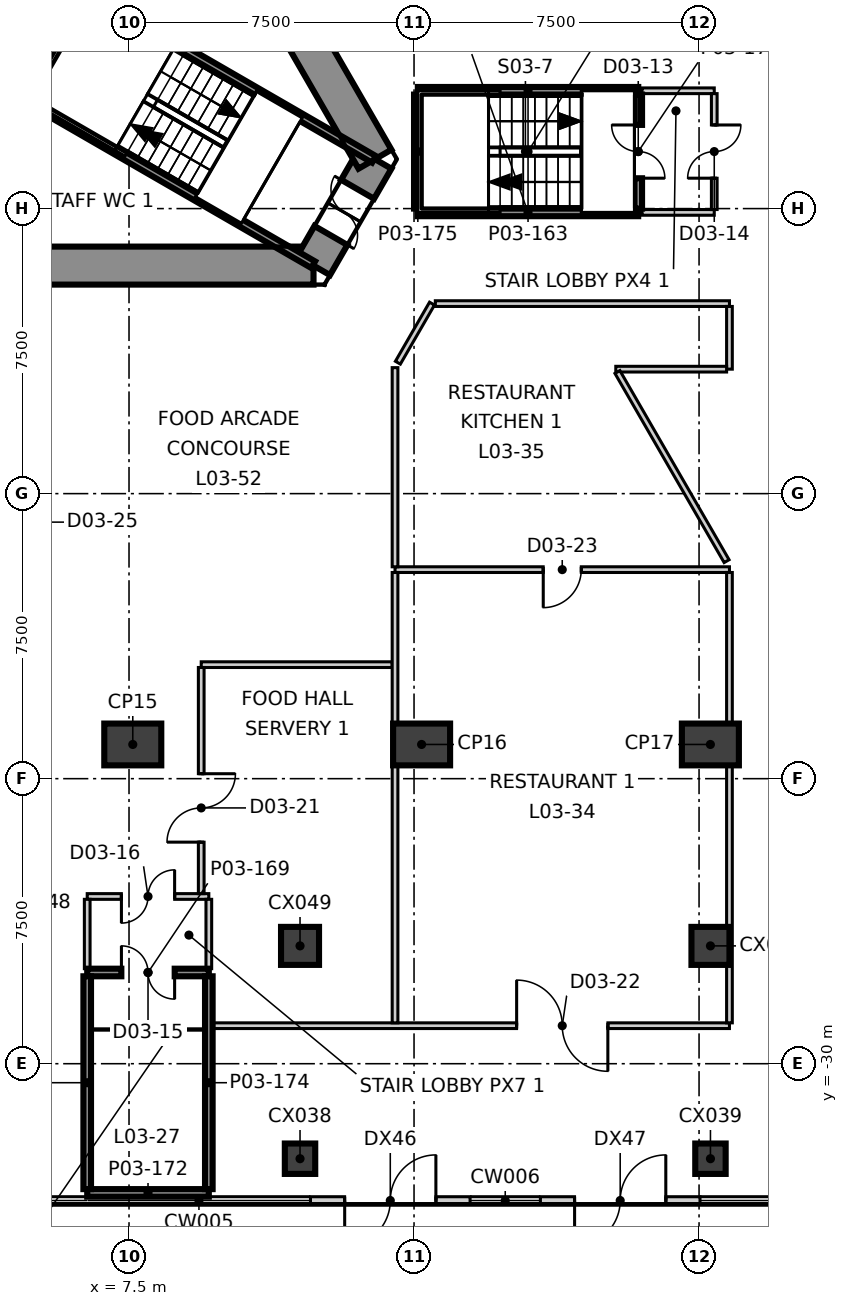
"""IFC4 building model, lengths in metres.
Left out: names, types, materials, properties, quantities, classifications, styles, units other than length and angle.
Written with IfcOpenShell. Run it as: python <this file> out.ifc"""

import sys

from ifc_helpers import new_model, si_unit, direction, frame, frame_2d, origin, origin_2d, place, context, subcontext, project, spatial, polyline, rectangle, outline, extrude, element, fill, save


model = new_model("IFC4")
c1 = context("Model", 3, precision=1e-05, world=origin(), true_north=direction((0.0, 1.0)))
c2 = subcontext(c1, "Body", "Model", "MODEL_VIEW")
j1 = project(units=[si_unit("LENGTHUNIT", "METRE"), si_unit("PLANEANGLEUNIT", "RADIAN")], contexts=[c1])
p1 = place(None, origin())
s1 = spatial("IfcSite", under=j1, at=p1, CompositionType="ELEMENT")
p2 = place(p1, origin())
s2 = spatial("IfcBuilding", under=s1, at=p2, CompositionType="ELEMENT")
p3 = place(p2, frame((0.0, 0.0, 19.9)))
s3 = spatial("IfcBuildingStorey", under=s2, at=p3, CompositionType="ELEMENT", Elevation=19.9)
p4 = place(p3, frame((-12.355, -9.0, -0.4), z_axis=(0.0, 0.0, 1.0), x_axis=(1.0, 0.0, 0.0)))
e1 = element("IfcWall", 1, at=p4, inside=s3, PredefinedType="SHEAR", context=c2, shape_type="SweptSolid", body=[
    extrude(outline(polyline([(-0.289, -0.5), (1.656, -0.5), (3.601, -0.5), (5.547, -0.5), (7.492, -0.5), (9.437, -0.5), (11.382, -0.5), (13.328, -0.5), (15.273, -0.5), (17.218, -0.5), (19.163, -0.5), (21.109, -0.5), (23.054, -0.5), (24.999, -0.5), (24.422, 0.5), (22.566, 0.5), (20.709, 0.5), (18.853, 0.5), (16.996, 0.5), (15.14, 0.5), (13.283, 0.5), (11.427, 0.5), (9.57, 0.5), (7.714, 0.5), (5.857, 0.5), (4.001, 0.5), (2.145, 0.5), (0.288, 0.5), (-0.289, -0.5)])), origin(), (0.0, 0.0, 1.0), 5.4),
])
p5 = place(p3, frame((12.355, -9.0, -0.4), z_axis=(0.0, 0.0, 1.0), x_axis=(0.500077567175, 0.865980615723, 0.0)))
e2 = element("IfcWall", 2, at=p5, inside=s3, PredefinedType="SHEAR", context=c2, shape_type="SweptSolid", body=[
    extrude(outline(polyline([(-0.288, -0.5), (1.617, -0.5), (3.522, -0.5), (2.945, 0.5), (1.617, 0.5), (0.289, 0.499), (-0.288, -0.5)])), origin(), (0.0, 0.0, 1.0), 5.4),
])
p6 = place(p5, frame((0.917, 0.0, 0.4)))
e3 = element("IfcOpeningElement", 3, at=p6, cuts=e2, PredefinedType="OPENING", context=c2, shape_type="SweptSolid", body=[
    extrude(rectangle(XDim=1.4, YDim=2.1, at=frame_2d((0.7, 1.05))), frame((0.0, 0.51, 0.0), z_axis=(0.0, -1.0, 0.0), x_axis=(1.0, 0.0, 0.0)), (0.0, 0.0, 1.0), 1.02),
])
p7 = place(p3, frame((13.972, -6.2, -0.4), z_axis=(0.0, 0.0, 1.0), x_axis=(-0.499992141631, 0.866029940768, 0.0)))
e4 = element("IfcWall", 4, at=p7, inside=s3, PredefinedType="SHEAR", context=c2, shape_type="SweptSolid", body=[
    extrude(outline(polyline([(-0.288, -0.5), (1.657, -0.5), (3.602, -0.5), (5.547, -0.5), (7.493, -0.5), (9.438, -0.5), (11.383, -0.5), (13.328, -0.5), (15.273, -0.5), (17.218, -0.499), (19.164, -0.499), (21.109, -0.499), (23.054, -0.499), (24.999, -0.499), (24.422, 0.5), (22.566, 0.5), (20.709, 0.5), (18.853, 0.5), (16.996, 0.5), (15.14, 0.5), (13.283, 0.5), (11.427, 0.5), (9.57, 0.5), (7.714, 0.5), (5.857, 0.5), (4.001, 0.5), (2.145, 0.5), (0.288, 0.5), (-0.288, -0.5)])), origin(), (0.0, 0.0, 1.0), 5.4),
])
p8 = place(p7, frame((11.455, 0.0, 0.4)))
e5 = element("IfcOpeningElement", 5, at=p8, cuts=e4, PredefinedType="OPENING", context=c2, shape_type="SweptSolid", body=[
    extrude(rectangle(XDim=1.8, YDim=2.1, at=frame_2d((0.9, 1.05))), frame((0.0, 0.51, 0.0), z_axis=(0.0, -1.0, 0.0), x_axis=(1.0, 0.0, 0.0)), (0.0, 0.0, 1.0), 1.02),
])
for number, where, z_axis, x_axis in (
    (6, (7.599, -21.6, -0.4), (0.0, 0.0, 1.0), (1.0, 0.0, 0.0)),
    (7, (15.199, -21.6, -0.4), (0.0, 0.0, 1.0), (1.0, 0.0, 0.0)),
    (8, (22.798, -21.6, -0.4), (0.0, 0.0, 1.0), (1.0, 0.0, 0.0)),
):
    element("IfcColumn", number, at=place(p3, frame(where, z_axis=z_axis, x_axis=x_axis)), inside=s3, PredefinedType="COLUMN", context=c2, shape_type="SweptSolid", body=[
        extrude(rectangle(XDim=1.5, YDim=1.1, at=origin_2d()), origin(), (0.0, 0.0, 1.0), 5.4),
    ])
for number, where, z_axis, x_axis in (
    (9, (12.0, -32.5, -0.4), (0.0, 0.0, 1.0), (1.0, 0.0, 0.0)),
    (10, (22.8, -32.5, -0.4), (0.0, 0.0, 1.0), (1.0, 0.0, 0.0)),
):
    element("IfcColumn", number, at=place(p3, frame(where, z_axis=z_axis, x_axis=x_axis)), inside=s3, PredefinedType="COLUMN", context=c2, shape_type="SweptSolid", body=[
        extrude(rectangle(XDim=0.8, YDim=0.8, at=origin_2d()), origin(), (0.0, 0.0, 1.0), 5.4),
    ])
for number, where, z_axis, x_axis in (
    (11, (12.0, -26.9, -0.4), (0.0, 0.0, 1.0), (1.0, 0.0, 0.0)),
    (12, (22.8, -26.9, -0.4), (0.0, 0.0, 1.0), (1.0, 0.0, 0.0)),
):
    element("IfcColumn", number, at=place(p3, frame(where, z_axis=z_axis, x_axis=x_axis)), inside=s3, PredefinedType="COLUMN", context=c2, shape_type="SweptSolid", body=[
        extrude(rectangle(XDim=1.0, YDim=1.0, at=origin_2d()), origin(), (0.0, 0.0, 1.0), 5.4),
    ])
p9 = place(p3, frame((12.275, -33.6, 0.0), z_axis=(0.0, 0.0, 1.0), x_axis=(1.0, 0.0, 0.0)))
e13 = element("IfcWall", 13, at=p9, inside=s3, PredefinedType="ELEMENTEDWALL", context=c2, shape_type="SweptSolid", body=[
    extrude(rectangle(XDim=4.2, YDim=0.2, at=frame_2d((2.1, 0.0))), origin(), (0.0, 0.0, 1.0), 5.0),
])
p10 = place(p9, frame((0.9, 0.0, 0.0)))
e14 = element("IfcOpeningElement", 14, at=p10, cuts=e13, PredefinedType="OPENING", context=c2, shape_type="SweptSolid", body=[
    extrude(rectangle(XDim=2.4, YDim=2.4, at=frame_2d((1.2, 1.2))), frame((0.0, 0.11, 0.0), z_axis=(0.0, -1.0, 0.0), x_axis=(1.0, 0.0, 0.0)), (0.0, 0.0, 1.0), 0.22),
])
p11 = place(p3, frame((18.325, -33.6, 0.0), z_axis=(0.0, 0.0, 1.0), x_axis=(1.0, 0.0, 0.0)))
e15 = element("IfcWall", 15, at=p11, inside=s3, PredefinedType="ELEMENTEDWALL", context=c2, shape_type="SweptSolid", body=[
    extrude(rectangle(XDim=4.2, YDim=0.2, at=frame_2d((2.1, 0.0))), origin(), (0.0, 0.0, 1.0), 5.0),
])
p12 = place(p11, frame((0.9, 0.0, 0.0)))
e16 = element("IfcOpeningElement", 16, at=p12, cuts=e15, PredefinedType="OPENING", context=c2, shape_type="SweptSolid", body=[
    extrude(rectangle(XDim=2.4, YDim=2.4, at=frame_2d((1.2, 1.2))), frame((0.0, 0.11, 0.0), z_axis=(0.0, -1.0, 0.0), x_axis=(1.0, 0.0, 0.0)), (0.0, 0.0, 1.0), 0.22),
])
for number, where, z_axis, x_axis in (
    (17, (21.0, -7.6, 0.0), (0.0, 0.0, 1.0), (1.0, 0.0, 0.0)),
    (18, (21.0, -4.4, 0.0), (0.0, 0.0, 1.0), (1.0, 0.0, 0.0)),
):
    element("IfcWall", number, at=place(p3, frame(where, z_axis=z_axis, x_axis=x_axis)), inside=s3, PredefinedType="PARTITIONING", context=c2, shape_type="SweptSolid", body=[
        extrude(rectangle(XDim=1.9, YDim=0.15, at=frame_2d((0.95, 0.0))), origin(), (0.0, 0.0, 1.0), 5.0),
    ])
p13 = place(p3, frame((6.4, -25.6, 0.0), z_axis=(0.0, 0.0, 1.0), x_axis=(1.0, 0.0, 0.0)))
e19 = element("IfcWall", 19, at=p13, inside=s3, PredefinedType="PARTITIONING", context=c2, shape_type="SweptSolid", body=[
    extrude(rectangle(XDim=3.2, YDim=0.15, at=frame_2d((1.6, 0.0))), origin(), (0.0, 0.0, 1.0), 5.0),
])
p14 = place(p13, frame((0.9, 0.0, 0.0)))
e20 = element("IfcOpeningElement", 20, at=p14, cuts=e19, PredefinedType="OPENING", context=c2, shape_type="SweptSolid", body=[
    extrude(rectangle(XDim=1.4, YDim=2.1, at=frame_2d((0.7, 1.05))), frame((0.0, 0.085, 0.0), z_axis=(0.0, -1.0, 0.0), x_axis=(1.0, 0.0, 0.0)), (0.0, 0.0, 1.0), 0.17),
])
for number, where, z_axis, x_axis in (
    (21, (6.4, -27.5, 0.0), (0.0, 0.0, 1.0), (0.0, 1.0, 0.0)),
    (22, (9.6, -27.5, 0.0), (0.0, 0.0, 1.0), (0.0, 1.0, 0.0)),
):
    element("IfcWall", number, at=place(p3, frame(where, z_axis=z_axis, x_axis=x_axis)), inside=s3, PredefinedType="PARTITIONING", context=c2, shape_type="SweptSolid", body=[
        extrude(rectangle(XDim=1.825, YDim=0.15, at=frame_2d((0.913, 0.0))), origin(), (0.0, 0.0, 1.0), 5.0),
    ])
p15 = place(p3, frame((14.5, -17.0, 0.0), z_axis=(0.0, 0.0, 1.0), x_axis=(1.0, 0.0, 0.0)))
e23 = element("IfcWall", 23, at=p15, inside=s3, PredefinedType="PARTITIONING", context=c2, shape_type="SweptSolid", body=[
    extrude(rectangle(XDim=8.8, YDim=0.15, at=frame_2d((4.4, 0.0))), origin(), (0.0, 0.0, 1.0), 5.0),
])
p16 = place(p15, frame((3.9, 0.0, 0.0)))
e24 = element("IfcOpeningElement", 24, at=p16, cuts=e23, PredefinedType="OPENING", context=c2, shape_type="SweptSolid", body=[
    extrude(rectangle(XDim=1.0, YDim=2.1, at=frame_2d((0.5, 1.05))), frame((0.0, 0.085, 0.0), z_axis=(0.0, -1.0, 0.0), x_axis=(1.0, 0.0, 0.0)), (0.0, 0.0, 1.0), 0.17),
])
p17 = place(p3, frame((14.5, -16.925, 0.0), z_axis=(0.0, 0.0, 1.0), x_axis=(0.0, 1.0, 0.0)))
e25 = element("IfcWall", 25, at=p17, inside=s3, PredefinedType="PARTITIONING", context=c2, shape_type="SweptSolid", body=[
    extrude(rectangle(XDim=5.24, YDim=0.15, at=frame_2d((2.62, 0.0))), origin(), (0.0, 0.0, 1.0), 5.0),
])
p18 = place(p3, frame((14.575, -11.555, 0.0), z_axis=(0.0, 0.0, 1.0), x_axis=(0.500087302212, 0.865974993961, 0.0)))
e26 = element("IfcWall", 26, at=p18, inside=s3, PredefinedType="PARTITIONING", context=c2, shape_type="SweptSolid", body=[
    extrude(rectangle(XDim=1.796, YDim=0.15, at=frame_2d((0.898, 0.0))), origin(), (0.0, 0.0, 1.0), 5.0),
])
p19 = place(p3, frame((15.56, -10.0, 0.0), z_axis=(0.0, 0.0, 1.0), x_axis=(1.0, 0.0, 0.0)))
e27 = element("IfcWall", 27, at=p19, inside=s3, PredefinedType="PARTITIONING", context=c2, shape_type="SweptSolid", body=[
    extrude(rectangle(XDim=7.74, YDim=0.15, at=frame_2d((3.87, 0.0))), origin(), (0.0, 0.0, 1.0), 5.0),
])
p20 = place(p3, frame((23.3, -11.725, 0.0), z_axis=(0.0, 0.0, 1.0), x_axis=(0.0, 1.0, 0.0)))
e28 = element("IfcWall", 28, at=p20, inside=s3, PredefinedType="PARTITIONING", context=c2, shape_type="SweptSolid", body=[
    extrude(rectangle(XDim=1.65, YDim=0.15, at=frame_2d((0.825, 0.0))), origin(), (0.0, 0.0, 1.0), 5.0),
])
p21 = place(p3, frame((20.309, -11.725, 0.0), z_axis=(0.0, 0.0, 1.0), x_axis=(1.0, 0.0, 0.0)))
e29 = element("IfcWall", 29, at=p21, inside=s3, PredefinedType="PARTITIONING", context=c2, shape_type="SweptSolid", body=[
    extrude(rectangle(XDim=2.916, YDim=0.15, at=frame_2d((1.458, 0.0))), origin(), (0.0, 0.0, 1.0), 5.0),
])
p22 = place(p3, frame((20.352, -11.8, 0.0), z_axis=(0.0, 0.0, 1.0), x_axis=(0.499940652507, -0.866059665364, 0.0)))
e30 = element("IfcWall", 30, at=p22, inside=s3, PredefinedType="PARTITIONING", context=c2, shape_type="SweptSolid", body=[
    extrude(rectangle(XDim=5.747, YDim=0.15, at=frame_2d((2.874, 0.0))), origin(), (0.0, 0.0, 1.0), 5.0),
])
p23 = place(p3, frame((22.9, -7.525, 0.0), z_axis=(0.0, 0.0, 1.0), x_axis=(0.0, 1.0, 0.0)))
e31 = element("IfcWall", 31, at=p23, inside=s3, PredefinedType="PARTITIONING", context=c2, shape_type="SweptSolid", body=[
    extrude(rectangle(XDim=3.05, YDim=0.15, at=frame_2d((1.525, 0.0))), origin(), (0.0, 0.0, 1.0), 5.0),
])
p24 = place(p23, frame((0.825, 0.0, 0.0)))
e32 = element("IfcOpeningElement", 32, at=p24, cuts=e31, PredefinedType="OPENING", context=c2, shape_type="SweptSolid", body=[
    extrude(rectangle(XDim=1.4, YDim=2.1, at=frame_2d((0.7, 1.05))), frame((0.0, 0.085, 0.0), z_axis=(0.0, -1.0, 0.0), x_axis=(1.0, 0.0, 0.0)), (0.0, 0.0, 1.0), 0.17),
])
p25 = place(p3, frame((9.7, -29.0, 0.0), z_axis=(0.0, 0.0, 1.0), x_axis=(1.0, 0.0, 0.0)))
e33 = element("IfcWall", 33, at=p25, inside=s3, PredefinedType="PARTITIONING", context=c2, shape_type="SweptSolid", body=[
    extrude(rectangle(XDim=13.6, YDim=0.15, at=frame_2d((6.8, 0.0))), origin(), (0.0, 0.0, 1.0), 5.0),
])
p26 = place(p25, frame((8.0, 0.0, 0.0)))
e34 = element("IfcOpeningElement", 34, at=p26, cuts=e33, PredefinedType="OPENING", context=c2, shape_type="SweptSolid", body=[
    extrude(rectangle(XDim=2.4, YDim=2.1, at=frame_2d((1.2, 1.05))), frame((0.0, 0.085, 0.0), z_axis=(0.0, -1.0, 0.0), x_axis=(1.0, 0.0, 0.0)), (0.0, 0.0, 1.0), 0.17),
])
p27 = place(p3, frame((9.4, -19.5, 0.0), z_axis=(0.0, 0.0, 1.0), x_axis=(1.0, 0.0, 0.0)))
e35 = element("IfcWall", 35, at=p27, inside=s3, PredefinedType="PARTITIONING", context=c2, shape_type="SweptSolid", body=[
    extrude(rectangle(XDim=5.025, YDim=0.15, at=frame_2d((2.513, 0.0))), origin(), (0.0, 0.0, 1.0), 5.0),
])
p28 = place(p3, frame((9.4, -25.525, 0.0), z_axis=(0.0, 0.0, 1.0), x_axis=(0.0, 1.0, 0.0)))
e36 = element("IfcWall", 36, at=p28, inside=s3, PredefinedType="PARTITIONING", context=c2, shape_type="SweptSolid", body=[
    extrude(rectangle(XDim=5.95, YDim=0.15, at=frame_2d((2.975, 0.0))), origin(), (0.0, 0.0, 1.0), 5.0),
])
p29 = place(p28, frame((1.355, 0.0, 0.0)))
e37 = element("IfcOpeningElement", 37, at=p29, cuts=e36, PredefinedType="OPENING", context=c2, shape_type="SweptSolid", body=[
    extrude(rectangle(XDim=1.8, YDim=2.1, at=frame_2d((0.9, 1.05))), frame((0.0, 0.085, 0.0), z_axis=(0.0, -1.0, 0.0), x_axis=(1.0, 0.0, 0.0)), (0.0, 0.0, 1.0), 0.17),
])
for number, where, z_axis, x_axis in (
    (38, (23.3, -28.925, 0.0), (0.0, 0.0, 1.0), (0.0, 1.0, 0.0)),
    (39, (14.5, -28.925, 0.0), (0.0, 0.0, 1.0), (0.0, 1.0, 0.0)),
):
    element("IfcWall", number, at=place(p3, frame(where, z_axis=z_axis, x_axis=x_axis)), inside=s3, PredefinedType="PARTITIONING", context=c2, shape_type="SweptSolid", body=[
        extrude(rectangle(XDim=11.85, YDim=0.15, at=frame_2d((5.925, 0.0))), origin(), (0.0, 0.0, 1.0), 5.0),
    ])
p30 = place(p3, frame((4.929, -4.693, 0.0), z_axis=(0.0, 0.0, 1.0), x_axis=(0.865987152174, -0.50006624788, 0.0)))
e40 = element("IfcWall", 40, at=p30, inside=s3, PredefinedType="SOLIDWALL", context=c2, shape_type="SweptSolid", body=[
    extrude(rectangle(XDim=8.565, YDim=0.2, at=frame_2d((4.282, 0.0))), origin(), (0.0, 0.0, 1.0), 5.0),
])
p31 = place(p3, frame((4.929, -4.462, 0.0), z_axis=(0.0, 0.0, 1.0), x_axis=(0.500200581029, 0.865909567298, 0.0)))
e41 = element("IfcWall", 41, at=p31, inside=s3, PredefinedType="SOLIDWALL", context=c2, shape_type="SweptSolid", body=[
    extrude(rectangle(XDim=2.799, YDim=0.2, at=frame_2d((1.399, 0.0))), origin(), (0.0, 0.0, 1.0), 5.0),
])
p32 = place(p3, frame((6.529, -1.922, 0.0), z_axis=(0.0, 0.0, 1.0), x_axis=(0.866036527536, -0.499980732602, 0.0)))
e42 = element("IfcWall", 42, at=p32, inside=s3, PredefinedType="SOLIDWALL", context=c2, shape_type="SweptSolid", body=[
    extrude(rectangle(XDim=8.564, YDim=0.2, at=frame_2d((4.282, 0.0))), origin(), (0.0, 0.0, 1.0), 5.0),
])
p33 = place(p3, frame((15.1, -4.4, 0.0), z_axis=(0.0, 0.0, 1.0), x_axis=(1.0, 0.0, 0.0)))
e43 = element("IfcWall", 43, at=p33, inside=s3, PredefinedType="SOLIDWALL", context=c2, shape_type="SweptSolid", body=[
    extrude(rectangle(XDim=5.8, YDim=0.2, at=frame_2d((2.9, 0.0))), origin(), (0.0, 0.0, 1.0), 5.0),
])
p34 = place(p3, frame((15.1, -7.6, 0.0), z_axis=(0.0, 0.0, 1.0), x_axis=(1.0, 0.0, 0.0)))
e44 = element("IfcWall", 44, at=p34, inside=s3, PredefinedType="SOLIDWALL", context=c2, shape_type="SweptSolid", body=[
    extrude(rectangle(XDim=5.798, YDim=0.2, at=frame_2d((2.899, 0.0))), origin(), (0.0, 0.0, 1.0), 5.0),
])
p35 = place(p3, frame((6.4, -27.6, 0.0), z_axis=(0.0, 0.0, 1.0), x_axis=(1.0, 0.0, 0.0)))
e45 = element("IfcWall", 45, at=p35, inside=s3, PredefinedType="SOLIDWALL", context=c2, shape_type="SweptSolid", body=[
    extrude(rectangle(XDim=3.2, YDim=0.2, at=frame_2d((1.6, 0.0))), origin(), (0.0, 0.0, 1.0), 5.0),
])
p36 = place(p35, frame((0.9, 0.0, 0.0)))
e46 = element("IfcOpeningElement", 46, at=p36, cuts=e45, PredefinedType="OPENING", context=c2, shape_type="SweptSolid", body=[
    extrude(rectangle(XDim=1.4, YDim=2.1, at=frame_2d((0.7, 1.05))), frame((0.0, 0.11, 0.0), z_axis=(0.0, -1.0, 0.0), x_axis=(1.0, 0.0, 0.0)), (0.0, 0.0, 1.0), 0.22),
])
p37 = place(p3, frame((6.4, -33.4, 0.0), z_axis=(0.0, 0.0, 1.0), x_axis=(1.0, 0.0, 0.0)))
e47 = element("IfcWall", 47, at=p37, inside=s3, PredefinedType="SOLIDWALL", context=c2, shape_type="SweptSolid", body=[
    extrude(rectangle(XDim=3.2, YDim=0.2, at=frame_2d((1.6, 0.0))), origin(), (0.0, 0.0, 1.0), 5.0),
])
for number, where, z_axis, x_axis in (
    (48, (6.4, -33.3, 0.0), (0.0, 0.0, 1.0), (0.0, 1.0, 0.0)),
    (49, (9.6, -33.3, 0.0), (0.0, 0.0, 1.0), (0.0, 1.0, 0.0)),
):
    element("IfcWall", number, at=place(p3, frame(where, z_axis=z_axis, x_axis=x_axis)), inside=s3, PredefinedType="SOLIDWALL", context=c2, shape_type="SweptSolid", body=[
        extrude(rectangle(XDim=5.6, YDim=0.2, at=frame_2d((2.8, 0.0))), origin(), (0.0, 0.0, 1.0), 5.0),
    ])
p38 = place(p3, frame((15.1, -7.5, 0.0), z_axis=(0.0, 0.0, 1.0), x_axis=(0.0, 1.0, 0.0)))
e50 = element("IfcWall", 50, at=p38, inside=s3, PredefinedType="SOLIDWALL", context=c2, shape_type="SweptSolid", body=[
    extrude(rectangle(XDim=3.0, YDim=0.2, at=frame_2d((1.5, 0.0))), origin(), (0.0, 0.0, 1.0), 5.0),
])
p39 = place(p3, frame((20.9, -7.5, 0.0), z_axis=(0.0, 0.0, 1.0), x_axis=(0.0, 1.0, 0.0)))
e51 = element("IfcWall", 51, at=p39, inside=s3, PredefinedType="SOLIDWALL", context=c2, shape_type="SweptSolid", body=[
    extrude(rectangle(XDim=3.0, YDim=0.2, at=frame_2d((1.5, 0.0))), origin(), (0.0, 0.0, 1.0), 5.0),
])
p40 = place(p39, frame((0.8, 0.0, 0.0)))
e52 = element("IfcOpeningElement", 52, at=p40, cuts=e51, PredefinedType="OPENING", context=c2, shape_type="SweptSolid", body=[
    extrude(rectangle(XDim=1.4, YDim=2.1, at=frame_2d((0.7, 1.05))), frame((0.0, 0.11, 0.0), z_axis=(0.0, -1.0, 0.0), x_axis=(1.0, 0.0, 0.0)), (0.0, 0.0, 1.0), 0.22),
])
p41 = place(p10, frame((2.4, 0.0, 0.0), z_axis=(0.0, 0.0, 1.0), x_axis=(-1.0, 0.0, 0.0)))
e53 = element("IfcDoor", 53, at=p41, inside=s3, OperationType="DOUBLE_DOOR_SINGLE_SWING", PredefinedType="DOOR", context=c2, shape_type="SweptSolid", body=[
    extrude(rectangle(XDim=2.4, YDim=2.4, at=frame_2d((1.2, 1.2))), frame((0.0, 0.025, 0.0), z_axis=(0.0, -1.0, 0.0), x_axis=(1.0, 0.0, 0.0)), (0.0, 0.0, 1.0), 0.05),
])
fill(e14, e53)
p42 = place(p12, frame((2.4, 0.0, 0.0), z_axis=(0.0, 0.0, 1.0), x_axis=(-1.0, 0.0, 0.0)))
e54 = element("IfcDoor", 54, at=p42, inside=s3, OperationType="DOUBLE_DOOR_SINGLE_SWING", PredefinedType="DOOR", context=c2, shape_type="SweptSolid", body=[
    extrude(rectangle(XDim=2.4, YDim=2.4, at=frame_2d((1.2, 1.2))), frame((0.0, 0.025, 0.0), z_axis=(0.0, -1.0, 0.0), x_axis=(1.0, 0.0, 0.0)), (0.0, 0.0, 1.0), 0.05),
])
fill(e16, e54)
p43 = place(p40, origin())
e55 = element("IfcDoor", 55, at=p43, inside=s3, OperationType="DOUBLE_DOOR_SINGLE_SWING", PredefinedType="DOOR", context=c2, shape_type="SweptSolid", body=[
    extrude(rectangle(XDim=1.4, YDim=2.1, at=frame_2d((0.7, 1.05))), frame((0.0, 0.025, 0.0), z_axis=(0.0, -1.0, 0.0), x_axis=(1.0, 0.0, 0.0)), (0.0, 0.0, 1.0), 0.05),
])
fill(e52, e55)
p44 = place(p24, origin())
e56 = element("IfcDoor", 56, at=p44, inside=s3, OperationType="DOUBLE_DOOR_SINGLE_SWING", PredefinedType="DOOR", context=c2, shape_type="SweptSolid", body=[
    extrude(rectangle(XDim=1.4, YDim=2.1, at=frame_2d((0.7, 1.05))), frame((0.0, 0.025, 0.0), z_axis=(0.0, -1.0, 0.0), x_axis=(1.0, 0.0, 0.0)), (0.0, 0.0, 1.0), 0.05),
])
fill(e32, e56)
p45 = place(p36, origin())
e57 = element("IfcDoor", 57, at=p45, inside=s3, OperationType="DOUBLE_DOOR_SINGLE_SWING", PredefinedType="DOOR", context=c2, shape_type="SweptSolid", body=[
    extrude(rectangle(XDim=1.4, YDim=2.1, at=frame_2d((0.7, 1.05))), frame((0.0, 0.025, 0.0), z_axis=(0.0, -1.0, 0.0), x_axis=(1.0, 0.0, 0.0)), (0.0, 0.0, 1.0), 0.05),
])
fill(e46, e57)
p46 = place(p14, origin())
e58 = element("IfcDoor", 58, at=p46, inside=s3, OperationType="DOUBLE_DOOR_SINGLE_SWING", PredefinedType="DOOR", context=c2, shape_type="SweptSolid", body=[
    extrude(rectangle(XDim=1.4, YDim=2.1, at=frame_2d((0.7, 1.05))), frame((0.0, 0.025, 0.0), z_axis=(0.0, -1.0, 0.0), x_axis=(1.0, 0.0, 0.0)), (0.0, 0.0, 1.0), 0.05),
])
fill(e20, e58)
p47 = place(p29, origin())
e59 = element("IfcDoor", 59, at=p47, inside=s3, OperationType="DOUBLE_DOOR_SINGLE_SWING", PredefinedType="DOOR", context=c2, shape_type="SweptSolid", body=[
    extrude(rectangle(XDim=1.8, YDim=2.1, at=frame_2d((0.9, 1.05))), frame((0.0, 0.025, 0.0), z_axis=(0.0, -1.0, 0.0), x_axis=(1.0, 0.0, 0.0)), (0.0, 0.0, 1.0), 0.05),
])
fill(e37, e59)
p48 = place(p26, origin())
e60 = element("IfcDoor", 60, at=p48, inside=s3, OperationType="DOUBLE_DOOR_SINGLE_SWING", PredefinedType="DOOR", context=c2, shape_type="SweptSolid", body=[
    extrude(rectangle(XDim=2.4, YDim=2.1, at=frame_2d((1.2, 1.05))), frame((0.0, 0.025, 0.0), z_axis=(0.0, -1.0, 0.0), x_axis=(1.0, 0.0, 0.0)), (0.0, 0.0, 1.0), 0.05),
])
fill(e34, e60)
p49 = place(p16, origin())
e61 = element("IfcDoor", 61, at=p49, inside=s3, OperationType="SINGLE_SWING_LEFT", PredefinedType="DOOR", context=c2, shape_type="SweptSolid", body=[
    extrude(rectangle(XDim=1.0, YDim=2.1, at=frame_2d((0.5, 1.05))), frame((0.0, 0.025, 0.0), z_axis=(0.0, -1.0, 0.0), x_axis=(1.0, 0.0, 0.0)), (0.0, 0.0, 1.0), 0.05),
])
fill(e24, e61)
p50 = place(p6, origin())
e62 = element("IfcDoor", 62, at=p50, inside=s3, OperationType="DOUBLE_DOOR_SINGLE_SWING", PredefinedType="DOOR", context=c2, shape_type="SweptSolid", body=[
    extrude(rectangle(XDim=1.4, YDim=2.1, at=frame_2d((0.7, 1.05))), frame((0.0, 0.025, 0.0), z_axis=(0.0, -1.0, 0.0), x_axis=(1.0, 0.0, 0.0)), (0.0, 0.0, 1.0), 0.05),
])
fill(e3, e62)
save(model, sys.argv[1])
